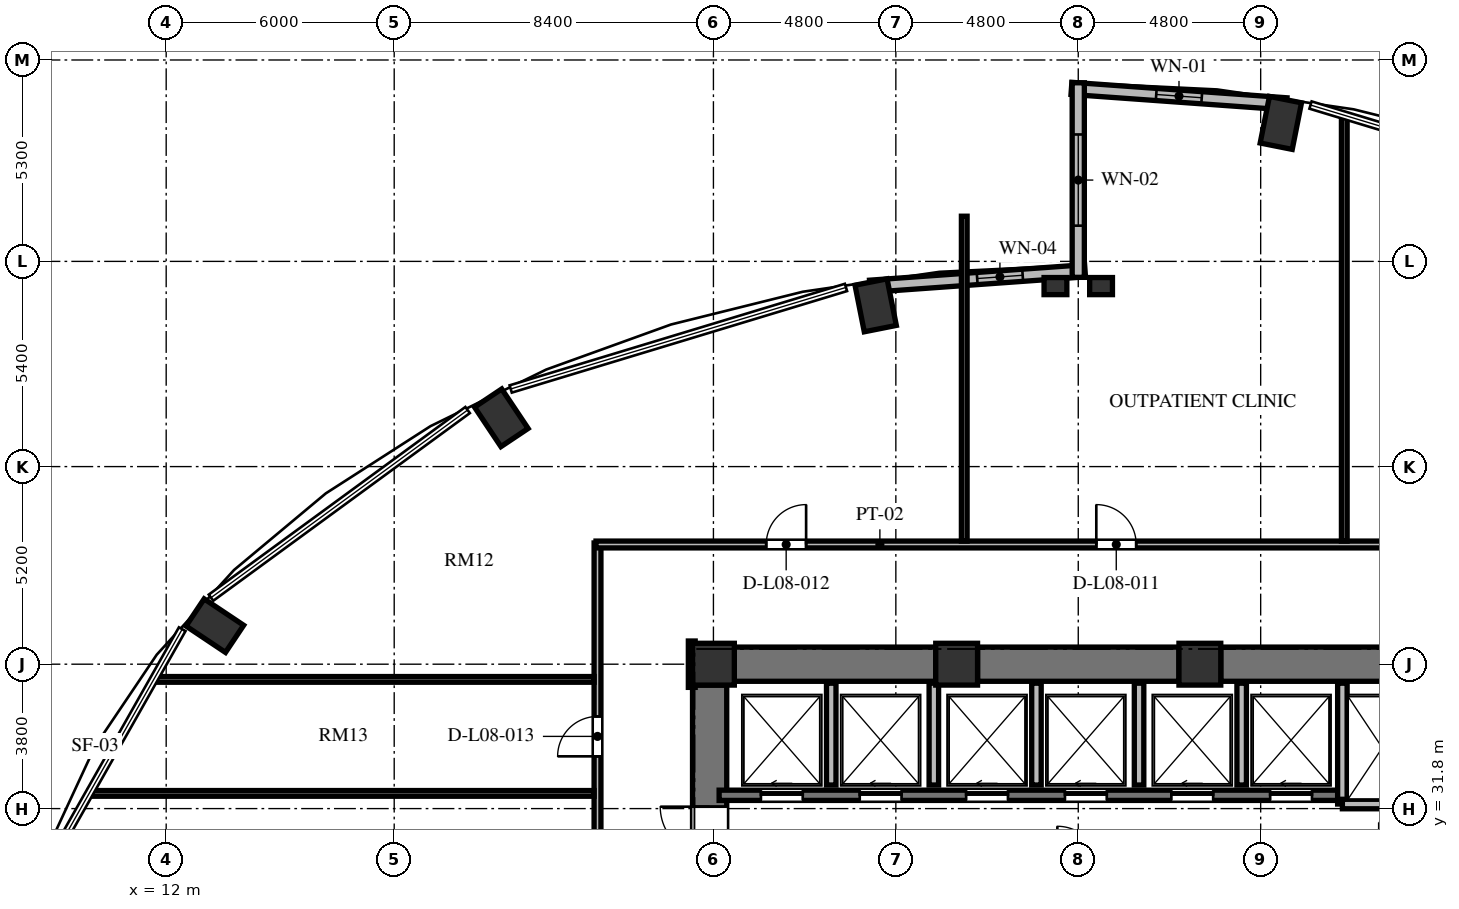
"""IFC4 building model, lengths in metres.
Left out: names, types, materials, properties, quantities, classifications, styles, units other than length and angle.
Written with IfcOpenShell. Run it as: python <this file> out.ifc"""

import sys

from ifc_helpers import new_model, si_unit, direction, frame, frame_2d, origin, origin_2d, place, context, subcontext, project, spatial, rectangle, extrude, element, fill, save


model = new_model("IFC4")
c1 = context("Model", 3, precision=1e-05, world=origin(), true_north=direction((0.0, 1.0)))
c2 = subcontext(c1, "Body", "Model", "MODEL_VIEW")
j1 = project(units=[si_unit("LENGTHUNIT", "METRE"), si_unit("PLANEANGLEUNIT", "RADIAN")], contexts=[c1])
p1 = place(None, origin())
s1 = spatial("IfcSite", under=j1, at=p1, CompositionType="ELEMENT")
p2 = place(p1, origin())
s2 = spatial("IfcBuilding", under=s1, at=p2, CompositionType="ELEMENT")
p3 = place(p2, frame((0.0, 0.0, 36.144)))
s3 = spatial("IfcBuildingStorey", under=s2, at=p3, CompositionType="ELEMENT", Elevation=36.144)
for number, where, z_axis, x_axis in (
    (1, (41.331, 49.844, 0.0), (0.0, 0.0, 1.0), (0.195, 0.981, 0.0)),
    (2, (30.669, 45.044, 0.0), (0.0, 0.0, 1.0), (-0.195, 0.981, 0.0)),
    (3, (20.819, 42.084, 0.0), (0.0, 0.0, 1.0), (-0.556, 0.831, 0.0)),
    (4, (13.28, 36.614, 0.0), (0.0, 0.0, 1.0), (-0.831, 0.556, 0.0)),
):
    element("IfcColumn", number, at=place(p3, frame(where, z_axis=z_axis, x_axis=x_axis)), inside=s3, PredefinedType="COLUMN", context=c2, shape_type="SweptSolid", body=[
        extrude(rectangle(XDim=1.25, YDim=0.86, at=origin_2d()), origin(), (0.0, 0.0, 1.0), 3.648),
    ])
for number, where, z_axis, x_axis in (
    (5, (39.2, 35.6, 0.0), (0.0, 0.0, 1.0), (1.0, 0.0, 0.0)),
    (6, (32.8, 35.6, 0.0), (0.0, 0.0, 1.0), (1.0, 0.0, 0.0)),
    (7, (26.4, 35.6, 0.0), (0.0, 0.0, 1.0), (1.0, 0.0, 0.0)),
):
    element("IfcColumn", number, at=place(p3, frame(where, z_axis=z_axis, x_axis=x_axis)), inside=s3, PredefinedType="COLUMN", context=c2, shape_type="SweptSolid", body=[
        extrude(rectangle(XDim=1.1, YDim=1.1, at=origin_2d()), origin(), (0.0, 0.0, 1.0), 3.648),
    ])
for number, where, z_axis, x_axis in (
    (8, (35.4, 45.55, 0.0), (0.0, 0.0, 1.0), (1.0, 0.0, 0.0)),
    (9, (36.6, 45.55, 0.0), (0.0, 0.0, 1.0), (1.0, 0.0, 0.0)),
):
    element("IfcColumn", number, at=place(p3, frame(where, z_axis=z_axis, x_axis=x_axis)), inside=s3, PredefinedType="PILASTER", context=c2, shape_type="SweptSolid", body=[
        extrude(rectangle(XDim=0.6, YDim=0.45, at=origin_2d()), origin(), (0.0, 0.0, 1.0), 3.648),
    ])
p4 = place(p3, frame((26.3, 20.95, 0.0), z_axis=(0.0, 0.0, 1.0), x_axis=(0.0, 1.0, 0.0)))
e10 = element("IfcWall", 10, at=p4, inside=s3, PredefinedType="SHEAR", context=c2, shape_type="SweptSolid", body=[
    extrude(rectangle(XDim=14.1, YDim=0.9, at=frame_2d((7.05, 0.0))), origin(), (0.0, 0.0, 1.0), 3.648),
])
p5 = place(p4, frame((6.5, 0.0, 0.0)))
e11 = element("IfcOpeningElement", 11, at=p5, cuts=e10, PredefinedType="OPENING", context=c2, shape_type="SweptSolid", body=[
    extrude(rectangle(XDim=1.2, YDim=2.15, at=frame_2d((0.6, 1.075))), frame((0.0, 0.46, 0.0), z_axis=(0.0, -1.0, 0.0), x_axis=(1.0, 0.0, 0.0)), (0.0, 0.0, 1.0), 0.92),
])
p6 = place(p4, frame((9.6, 0.0, 0.0)))
e12 = element("IfcOpeningElement", 12, at=p6, cuts=e10, PredefinedType="OPENING", context=c2, shape_type="SweptSolid", body=[
    extrude(rectangle(XDim=1.3, YDim=2.2, at=frame_2d((0.65, 1.1))), frame((0.0, 0.46, 0.0), z_axis=(0.0, -1.0, 0.0), x_axis=(1.0, 0.0, 0.0)), (0.0, 0.0, 1.0), 0.92),
])
p7 = place(p4, frame((3.26, 0.0, 0.0)))
e13 = element("IfcOpeningElement", 13, at=p7, cuts=e10, PredefinedType="OPENING", context=c2, shape_type="SweptSolid", body=[
    extrude(rectangle(XDim=1.3, YDim=2.2, at=frame_2d((0.65, 1.1))), frame((0.0, 0.46, 0.0), z_axis=(0.0, -1.0, 0.0), x_axis=(1.0, 0.0, 0.0)), (0.0, 0.0, 1.0), 0.92),
])
p8 = place(p3, frame((26.95, 35.6, 0.0), z_axis=(0.0, 0.0, 1.0), x_axis=(1.0, 0.0, 0.0)))
e14 = element("IfcWall", 14, at=p8, inside=s3, PredefinedType="SHEAR", context=c2, shape_type="SweptSolid", body=[
    extrude(rectangle(XDim=5.3, YDim=0.9, at=frame_2d((2.65, 0.0))), origin(), (0.0, 0.0, 1.0), 3.648),
])
p9 = place(p3, frame((33.35, 35.6, 0.0), z_axis=(0.0, 0.0, 1.0), x_axis=(1.0, 0.0, 0.0)))
e15 = element("IfcWall", 15, at=p9, inside=s3, PredefinedType="SHEAR", context=c2, shape_type="SweptSolid", body=[
    extrude(rectangle(XDim=5.3, YDim=0.9, at=frame_2d((2.65, 0.0))), origin(), (0.0, 0.0, 1.0), 3.648),
])
p10 = place(p3, frame((39.75, 35.6, 0.0), z_axis=(0.0, 0.0, 1.0), x_axis=(1.0, 0.0, 0.0)))
e16 = element("IfcWall", 16, at=p10, inside=s3, PredefinedType="SHEAR", context=c2, shape_type="SweptSolid", body=[
    extrude(rectangle(XDim=5.3, YDim=0.9, at=frame_2d((2.65, 0.0))), origin(), (0.0, 0.0, 1.0), 3.648),
])
p11 = place(p3, frame((41.481, 50.346, 0.0), z_axis=(0.0, 0.0, 1.0), x_axis=(-0.997422321809, 0.071754525696, 0.0)))
e17 = element("IfcWall", 17, at=p11, inside=s3, PredefinedType="SOLIDWALL", context=c2, shape_type="SweptSolid", body=[
    extrude(rectangle(XDim=5.675, YDim=0.32, at=frame_2d((2.838, 0.0))), origin(), (0.0, 0.0, 1.0), 3.428),
])
p12 = place(p11, frame((2.238, 0.0, 0.85)))
e18 = element("IfcOpeningElement", 18, at=p12, cuts=e17, PredefinedType="OPENING", context=c2, shape_type="SweptSolid", body=[
    extrude(rectangle(XDim=1.2, YDim=2.2, at=frame_2d((0.6, 1.1))), frame((0.0, 0.17, 0.0), z_axis=(0.0, -1.0, 0.0), x_axis=(1.0, 0.0, 0.0)), (0.0, 0.0, 1.0), 0.34),
])
p13 = place(p3, frame((36.179, 45.953, 0.0), z_axis=(0.0, 0.0, 1.0), x_axis=(-0.997421878774, -0.071760683825, 0.0)))
e19 = element("IfcWall", 19, at=p13, inside=s3, PredefinedType="SOLIDWALL", context=c2, shape_type="SweptSolid", body=[
    extrude(rectangle(XDim=5.675, YDim=0.32, at=frame_2d((2.837, 0.0))), origin(), (0.0, 0.0, 1.0), 3.428),
])
p14 = place(p13, frame((1.646, 0.0, 0.85)))
e20 = element("IfcOpeningElement", 20, at=p14, cuts=e19, PredefinedType="OPENING", context=c2, shape_type="SweptSolid", body=[
    extrude(rectangle(XDim=1.2, YDim=1.8, at=frame_2d((0.6, 0.9))), frame((0.0, 0.17, 0.0), z_axis=(0.0, -1.0, 0.0), x_axis=(1.0, 0.0, 0.0)), (0.0, 0.0, 1.0), 0.34),
])
p15 = place(p3, frame((36.0, 50.9, 0.0), z_axis=(0.0, 0.0, 1.0), x_axis=(0.0, -1.0, 0.0)))
e21 = element("IfcWall", 21, at=p15, inside=s3, PredefinedType="SOLIDWALL", context=c2, shape_type="SweptSolid", body=[
    extrude(rectangle(XDim=5.12, YDim=0.32, at=frame_2d((2.56, 0.0))), origin(), (0.0, 0.0, 1.0), 3.428),
])
p16 = place(p15, frame((1.36, 0.0, 0.84)))
e22 = element("IfcOpeningElement", 22, at=p16, cuts=e21, PredefinedType="OPENING", context=c2, shape_type="SweptSolid", body=[
    extrude(rectangle(XDim=2.4, YDim=2.04, at=frame_2d((1.2, 1.02))), frame((0.0, 0.17, 0.0), z_axis=(0.0, -1.0, 0.0), x_axis=(1.0, 0.0, 0.0)), (0.0, 0.0, 1.0), 0.34),
])
p17 = place(p3, frame((26.55, 32.15, 0.0), z_axis=(0.0, 0.0, 1.0), x_axis=(1.0, 0.0, 0.0)))
e23 = element("IfcWall", 23, at=p17, inside=s3, PredefinedType="SHEAR", context=c2, shape_type="SweptSolid", body=[
    extrude(rectangle(XDim=16.4, YDim=0.27, at=frame_2d((8.2, 0.0))), origin(), (0.0, 0.0, 1.0), 3.648),
])
p18 = place(p17, frame((1.1, 0.0, 0.0)))
e24 = element("IfcOpeningElement", 24, at=p18, cuts=e23, PredefinedType="OPENING", context=c2, shape_type="SweptSolid", body=[
    extrude(rectangle(XDim=1.1, YDim=2.2, at=frame_2d((0.55, 1.1))), frame((0.0, 0.145, 0.0), z_axis=(0.0, -1.0, 0.0), x_axis=(1.0, 0.0, 0.0)), (0.0, 0.0, 1.0), 0.29),
])
p19 = place(p17, frame((3.7, 0.0, 0.0)))
e25 = element("IfcOpeningElement", 25, at=p19, cuts=e23, PredefinedType="OPENING", context=c2, shape_type="SweptSolid", body=[
    extrude(rectangle(XDim=1.1, YDim=2.2, at=frame_2d((0.55, 1.1))), frame((0.0, 0.145, 0.0), z_axis=(0.0, -1.0, 0.0), x_axis=(1.0, 0.0, 0.0)), (0.0, 0.0, 1.0), 0.29),
])
p20 = place(p17, frame((6.5, 0.0, 0.0)))
e26 = element("IfcOpeningElement", 26, at=p20, cuts=e23, PredefinedType="OPENING", context=c2, shape_type="SweptSolid", body=[
    extrude(rectangle(XDim=1.1, YDim=2.2, at=frame_2d((0.55, 1.1))), frame((0.0, 0.145, 0.0), z_axis=(0.0, -1.0, 0.0), x_axis=(1.0, 0.0, 0.0)), (0.0, 0.0, 1.0), 0.29),
])
p21 = place(p17, frame((9.1, 0.0, 0.0)))
e27 = element("IfcOpeningElement", 27, at=p21, cuts=e23, PredefinedType="OPENING", context=c2, shape_type="SweptSolid", body=[
    extrude(rectangle(XDim=1.1, YDim=2.2, at=frame_2d((0.55, 1.1))), frame((0.0, 0.145, 0.0), z_axis=(0.0, -1.0, 0.0), x_axis=(1.0, 0.0, 0.0)), (0.0, 0.0, 1.0), 0.29),
])
p22 = place(p17, frame((11.9, 0.0, 0.0)))
e28 = element("IfcOpeningElement", 28, at=p22, cuts=e23, PredefinedType="OPENING", context=c2, shape_type="SweptSolid", body=[
    extrude(rectangle(XDim=1.1, YDim=2.2, at=frame_2d((0.55, 1.1))), frame((0.0, 0.145, 0.0), z_axis=(0.0, -1.0, 0.0), x_axis=(1.0, 0.0, 0.0)), (0.0, 0.0, 1.0), 0.29),
])
p23 = place(p17, frame((14.5, 0.0, 0.0)))
e29 = element("IfcOpeningElement", 29, at=p23, cuts=e23, PredefinedType="OPENING", context=c2, shape_type="SweptSolid", body=[
    extrude(rectangle(XDim=1.1, YDim=2.2, at=frame_2d((0.55, 1.1))), frame((0.0, 0.145, 0.0), z_axis=(0.0, -1.0, 0.0), x_axis=(1.0, 0.0, 0.0)), (0.0, 0.0, 1.0), 0.29),
])
p24 = place(p3, frame((42.95, 31.92, 0.0), z_axis=(0.0, 0.0, 1.0), x_axis=(0.0, 1.0, 0.0)))
e30 = element("IfcWall", 30, at=p24, inside=s3, PredefinedType="SOLIDWALL", context=c2, shape_type="SweptSolid", body=[
    extrude(rectangle(XDim=3.18, YDim=0.25, at=frame_2d((1.59, 0.0))), origin(), (0.0, 0.0, 1.0), 3.428),
])
p25 = place(p3, frame((42.95, 31.92, 0.0), z_axis=(0.0, 0.0, 1.0), x_axis=(1.0, 0.0, 0.0)))
e31 = element("IfcWall", 31, at=p25, inside=s3, PredefinedType="SOLIDWALL", context=c2, shape_type="SweptSolid", body=[
    extrude(rectangle(XDim=2.3, YDim=0.25, at=frame_2d((1.15, 0.0))), origin(), (0.0, 0.0, 1.0), 3.428),
])
for number, where, z_axis, x_axis in (
    (32, (29.5, 32.42, 0.0), (0.0, 0.0, 1.0), (0.0, 1.0, 0.0)),
    (33, (32.2, 32.42, 0.0), (0.0, 0.0, 1.0), (0.0, 1.0, 0.0)),
    (34, (34.9, 32.42, 0.0), (0.0, 0.0, 1.0), (0.0, 1.0, 0.0)),
    (35, (37.6, 32.42, 0.0), (0.0, 0.0, 1.0), (0.0, 1.0, 0.0)),
    (36, (40.3, 32.42, 0.0), (0.0, 0.0, 1.0), (0.0, 1.0, 0.0)),
):
    element("IfcWall", number, at=place(p3, frame(where, z_axis=z_axis, x_axis=x_axis)), inside=s3, PredefinedType="SOLIDWALL", context=c2, shape_type="SweptSolid", body=[
        extrude(rectangle(XDim=2.68, YDim=0.25, at=frame_2d((1.34, 0.0))), origin(), (0.0, 0.0, 1.0), 3.428),
    ])
p26 = place(p3, frame((23.35, 29.36, 0.0), z_axis=(0.0, 0.0, 1.0), x_axis=(0.0, 1.0, 0.0)))
e37 = element("IfcWall", 37, at=p26, inside=s3, PredefinedType="PARTITIONING", context=c2, shape_type="SweptSolid", body=[
    extrude(rectangle(XDim=9.43, YDim=0.18, at=frame_2d((4.715, 0.0))), origin(), (0.0, 0.0, 1.0), 3.428),
])
p27 = place(p26, frame((3.815, 0.0, 0.0)))
e38 = element("IfcOpeningElement", 38, at=p27, cuts=e37, PredefinedType="OPENING", context=c2, shape_type="SweptSolid", body=[
    extrude(rectangle(XDim=1.05, YDim=2.15, at=frame_2d((0.525, 1.075))), frame((0.0, 0.1, 0.0), z_axis=(0.0, -1.0, 0.0), x_axis=(1.0, 0.0, 0.0)), (0.0, 0.0, 1.0), 0.2),
])
p28 = place(p3, frame((23.31, 38.75, 0.0), z_axis=(0.0, 0.0, 1.0), x_axis=(1.0, 0.0, 0.0)))
e39 = element("IfcWall", 39, at=p28, inside=s3, PredefinedType="PARTITIONING", context=c2, shape_type="SweptSolid", body=[
    extrude(rectangle(XDim=29.88, YDim=0.18, at=frame_2d((14.94, 0.0))), origin(), (0.0, 0.0, 1.0), 3.053),
])
p29 = place(p28, frame((24.101, 0.0, 0.0)))
e40 = element("IfcOpeningElement", 40, at=p29, cuts=e39, PredefinedType="OPENING", context=c2, shape_type="SweptSolid", body=[
    extrude(rectangle(XDim=1.05, YDim=2.15, at=frame_2d((0.525, 1.075))), frame((0.0, 0.1, 0.0), z_axis=(0.0, -1.0, 0.0), x_axis=(1.0, 0.0, 0.0)), (0.0, 0.0, 1.0), 0.2),
])
p30 = place(p28, frame((13.165, 0.0, 0.0)))
e41 = element("IfcOpeningElement", 41, at=p30, cuts=e39, PredefinedType="OPENING", context=c2, shape_type="SweptSolid", body=[
    extrude(rectangle(XDim=1.05, YDim=2.15, at=frame_2d((0.525, 1.075))), frame((0.0, 0.1, 0.0), z_axis=(0.0, -1.0, 0.0), x_axis=(1.0, 0.0, 0.0)), (0.0, 0.0, 1.0), 0.2),
])
p31 = place(p28, frame((4.479, 0.0, 0.0)))
e42 = element("IfcOpeningElement", 42, at=p31, cuts=e39, PredefinedType="OPENING", context=c2, shape_type="SweptSolid", body=[
    extrude(rectangle(XDim=1.05, YDim=2.15, at=frame_2d((0.525, 1.075))), frame((0.0, 0.1, 0.0), z_axis=(0.0, -1.0, 0.0), x_axis=(1.0, 0.0, 0.0)), (0.0, 0.0, 1.0), 0.2),
])
p32 = place(p3, frame((25.83, 36.21, 0.0), z_axis=(0.0, 0.0, 1.0), x_axis=(0.0, -1.0, 0.0)))
e43 = element("IfcWall", 43, at=p32, inside=s3, PredefinedType="PARTITIONING", context=c2, shape_type="SweptSolid", body=[
    extrude(rectangle(XDim=1.22, YDim=0.18, at=frame_2d((0.61, 0.0))), origin(), (0.0, 0.0, 1.0), 3.428),
])
p33 = place(p3, frame((9.978, 32.2, 0.0), z_axis=(0.0, 0.0, 1.0), x_axis=(1.0, 0.0, 0.0)))
e44 = element("IfcWall", 44, at=p33, inside=s3, PredefinedType="PARTITIONING", context=c2, shape_type="SweptSolid", body=[
    extrude(rectangle(XDim=13.282, YDim=0.15, at=frame_2d((6.641, 0.0))), origin(), (0.0, 0.0, 1.0), 3.428),
])
p34 = place(p3, frame((11.677, 35.2, 0.0), z_axis=(0.0, 0.0, 1.0), x_axis=(1.0, 0.0, 0.0)))
e45 = element("IfcWall", 45, at=p34, inside=s3, PredefinedType="PARTITIONING", context=c2, shape_type="SweptSolid", body=[
    extrude(rectangle(XDim=11.583, YDim=0.15, at=frame_2d((5.791, 0.0))), origin(), (0.0, 0.0, 1.0), 3.428),
])
p35 = place(p3, frame((33.0, 38.84, 0.0), z_axis=(0.0, 0.0, 1.0), x_axis=(0.0, 1.0, 0.0)))
e46 = element("IfcWall", 46, at=p35, inside=s3, PredefinedType="PARTITIONING", context=c2, shape_type="SweptSolid", body=[
    extrude(rectangle(XDim=8.549, YDim=0.15, at=frame_2d((4.274, 0.0))), origin(), (0.0, 0.0, 1.0), 3.428),
])
p36 = place(p3, frame((43.0, 38.84, 0.0), z_axis=(0.0, 0.0, 1.0), x_axis=(0.0, 1.0, 0.0)))
e47 = element("IfcWall", 47, at=p36, inside=s3, PredefinedType="PARTITIONING", context=c2, shape_type="SweptSolid", body=[
    extrude(rectangle(XDim=11.193, YDim=0.15, at=frame_2d((5.597, 0.0))), origin(), (0.0, 0.0, 1.0), 3.428),
])
p37 = place(p12, origin())
e48 = element("IfcWindow", 48, at=p37, inside=s3, PartitioningType="SINGLE_PANEL", PredefinedType="WINDOW", context=c2, shape_type="SweptSolid", body=[
    extrude(rectangle(XDim=1.2, YDim=2.2, at=frame_2d((0.6, 1.1))), frame((0.0, 0.03, 0.0), z_axis=(0.0, -1.0, 0.0), x_axis=(1.0, 0.0, 0.0)), (0.0, 0.0, 1.0), 0.06),
])
fill(e18, e48)
p38 = place(p14, origin())
e49 = element("IfcWindow", 49, at=p38, inside=s3, PartitioningType="SINGLE_PANEL", PredefinedType="WINDOW", context=c2, shape_type="SweptSolid", body=[
    extrude(rectangle(XDim=1.2, YDim=1.8, at=frame_2d((0.6, 0.9))), frame((0.0, 0.03, 0.0), z_axis=(0.0, -1.0, 0.0), x_axis=(1.0, 0.0, 0.0)), (0.0, 0.0, 1.0), 0.06),
])
fill(e20, e49)
p39 = place(p16, origin())
e50 = element("IfcWindow", 50, at=p39, inside=s3, PartitioningType="SINGLE_PANEL", PredefinedType="WINDOW", context=c2, shape_type="SweptSolid", body=[
    extrude(rectangle(XDim=2.4, YDim=2.04, at=frame_2d((1.2, 1.02))), frame((0.0, 0.03, 0.0), z_axis=(0.0, -1.0, 0.0), x_axis=(1.0, 0.0, 0.0)), (0.0, 0.0, 1.0), 0.06),
])
fill(e22, e50)
p40 = place(p6, origin())
e51 = element("IfcDoor", 51, at=p40, inside=s3, OperationType="SINGLE_SWING_RIGHT", PredefinedType="DOOR", context=c2, shape_type="SweptSolid", body=[
    extrude(rectangle(XDim=1.3, YDim=2.2, at=frame_2d((0.65, 1.1))), frame((0.0, 0.025, 0.0), z_axis=(0.0, -1.0, 0.0), x_axis=(1.0, 0.0, 0.0)), (0.0, 0.0, 1.0), 0.05),
])
fill(e12, e51)
p41 = place(p18, origin())
e52 = element("IfcDoor", 52, at=p41, inside=s3, OperationType="SLIDING_TO_LEFT", PredefinedType="DOOR", context=c2, shape_type="SweptSolid", body=[
    extrude(rectangle(XDim=1.1, YDim=2.2, at=frame_2d((0.55, 1.1))), frame((0.0, 0.025, 0.0), z_axis=(0.0, -1.0, 0.0), x_axis=(1.0, 0.0, 0.0)), (0.0, 0.0, 1.0), 0.05),
])
fill(e24, e52)
p42 = place(p19, origin())
e53 = element("IfcDoor", 53, at=p42, inside=s3, OperationType="SLIDING_TO_LEFT", PredefinedType="DOOR", context=c2, shape_type="SweptSolid", body=[
    extrude(rectangle(XDim=1.1, YDim=2.2, at=frame_2d((0.55, 1.1))), frame((0.0, 0.025, 0.0), z_axis=(0.0, -1.0, 0.0), x_axis=(1.0, 0.0, 0.0)), (0.0, 0.0, 1.0), 0.05),
])
fill(e25, e53)
p43 = place(p20, origin())
e54 = element("IfcDoor", 54, at=p43, inside=s3, OperationType="SLIDING_TO_LEFT", PredefinedType="DOOR", context=c2, shape_type="SweptSolid", body=[
    extrude(rectangle(XDim=1.1, YDim=2.2, at=frame_2d((0.55, 1.1))), frame((0.0, 0.025, 0.0), z_axis=(0.0, -1.0, 0.0), x_axis=(1.0, 0.0, 0.0)), (0.0, 0.0, 1.0), 0.05),
])
fill(e26, e54)
p44 = place(p21, origin())
e55 = element("IfcDoor", 55, at=p44, inside=s3, OperationType="SLIDING_TO_LEFT", PredefinedType="DOOR", context=c2, shape_type="SweptSolid", body=[
    extrude(rectangle(XDim=1.1, YDim=2.2, at=frame_2d((0.55, 1.1))), frame((0.0, 0.025, 0.0), z_axis=(0.0, -1.0, 0.0), x_axis=(1.0, 0.0, 0.0)), (0.0, 0.0, 1.0), 0.05),
])
fill(e27, e55)
p45 = place(p22, origin())
e56 = element("IfcDoor", 56, at=p45, inside=s3, OperationType="SLIDING_TO_LEFT", PredefinedType="DOOR", context=c2, shape_type="SweptSolid", body=[
    extrude(rectangle(XDim=1.1, YDim=2.2, at=frame_2d((0.55, 1.1))), frame((0.0, 0.025, 0.0), z_axis=(0.0, -1.0, 0.0), x_axis=(1.0, 0.0, 0.0)), (0.0, 0.0, 1.0), 0.05),
])
fill(e28, e56)
p46 = place(p23, origin())
e57 = element("IfcDoor", 57, at=p46, inside=s3, OperationType="SLIDING_TO_LEFT", PredefinedType="DOOR", context=c2, shape_type="SweptSolid", body=[
    extrude(rectangle(XDim=1.1, YDim=2.2, at=frame_2d((0.55, 1.1))), frame((0.0, 0.025, 0.0), z_axis=(0.0, -1.0, 0.0), x_axis=(1.0, 0.0, 0.0)), (0.0, 0.0, 1.0), 0.05),
])
fill(e29, e57)
p47 = place(p30, origin())
e58 = element("IfcDoor", 58, at=p47, inside=s3, OperationType="SINGLE_SWING_LEFT", PredefinedType="DOOR", context=c2, shape_type="SweptSolid", body=[
    extrude(rectangle(XDim=1.05, YDim=2.15, at=frame_2d((0.525, 1.075))), frame((0.0, 0.025, 0.0), z_axis=(0.0, -1.0, 0.0), x_axis=(1.0, 0.0, 0.0)), (0.0, 0.0, 1.0), 0.05),
])
fill(e41, e58)
p48 = place(p31, origin())
e59 = element("IfcDoor", 59, at=p48, inside=s3, OperationType="SINGLE_SWING_RIGHT", PredefinedType="DOOR", context=c2, shape_type="SweptSolid", body=[
    extrude(rectangle(XDim=1.05, YDim=2.15, at=frame_2d((0.525, 1.075))), frame((0.0, 0.025, 0.0), z_axis=(0.0, -1.0, 0.0), x_axis=(1.0, 0.0, 0.0)), (0.0, 0.0, 1.0), 0.05),
])
fill(e42, e59)
p49 = place(p27, origin())
e60 = element("IfcDoor", 60, at=p49, inside=s3, OperationType="SINGLE_SWING_LEFT", PredefinedType="DOOR", context=c2, shape_type="SweptSolid", body=[
    extrude(rectangle(XDim=1.05, YDim=2.15, at=frame_2d((0.525, 1.075))), frame((0.0, 0.025, 0.0), z_axis=(0.0, -1.0, 0.0), x_axis=(1.0, 0.0, 0.0)), (0.0, 0.0, 1.0), 0.05),
])
fill(e38, e60)
save(model, sys.argv[1])
